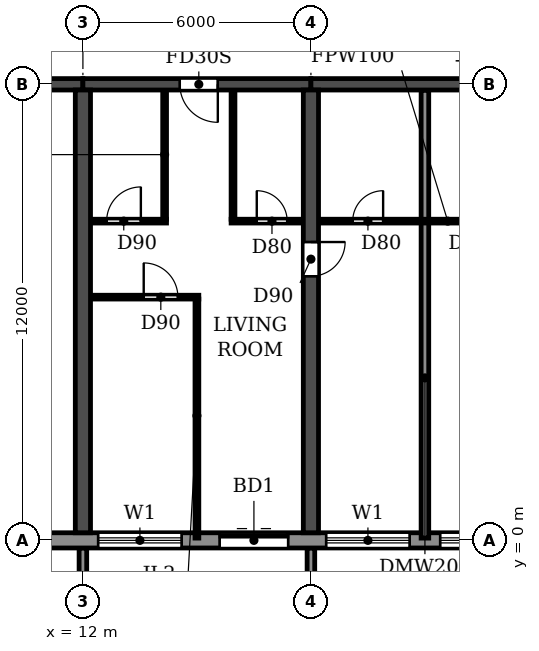
"""IFC4 building model, lengths in metres.
Left out: names, types, materials, properties, quantities, classifications, styles, units other than length and angle.
Written with IfcOpenShell. Run it as: python <this file> out.ifc"""

import sys

from ifc_helpers import new_model, si_unit, direction, frame, frame_2d, origin, place, context, subcontext, project, spatial, polyline, rectangle, outline, extrude, source, transform, mapped, element, fill, save


model = new_model("IFC4")
c1 = context("Model", 3, precision=1e-05, world=origin(), true_north=direction((0.0, 1.0)))
c2 = subcontext(c1, "Body", "Model", "MODEL_VIEW")
j1 = project(units=[si_unit("LENGTHUNIT", "METRE"), si_unit("PLANEANGLEUNIT", "RADIAN")], contexts=[c1])
p1 = place(None, origin())
s1 = spatial("IfcSite", under=j1, at=p1, CompositionType="ELEMENT")
p2 = place(p1, origin())
s2 = spatial("IfcBuilding", under=s1, at=p2, CompositionType="ELEMENT")
p3 = place(p2, frame((0.0, 0.0, 56.4)))
s3 = spatial("IfcBuildingStorey", under=s2, at=p3, CompositionType="ELEMENT", Elevation=56.4)
p4 = place(p3, frame((12.0, 0.2, 0.0), z_axis=(0.0, 0.0, 1.0), x_axis=(0.0, 1.0, 0.0)))
e1 = element("IfcWall", 1, at=p4, inside=s3, PredefinedType="SHEAR", context=c2, shape_type="SweptSolid", body=[
    extrude(rectangle(XDim=11.65, YDim=0.4, at=frame_2d((5.825, 0.0))), origin(), (0.0, 0.0, 1.0), 3.05),
])
p5 = place(p3, frame((18.0, 0.2, 0.0), z_axis=(0.0, 0.0, 1.0), x_axis=(0.0, 1.0, 0.0)))
e2 = element("IfcWall", 2, at=p5, inside=s3, PredefinedType="SHEAR", context=c2, shape_type="SweptSolid", body=[
    extrude(rectangle(XDim=11.65, YDim=0.4, at=frame_2d((5.825, 0.0))), origin(), (0.0, 0.0, 1.0), 3.05),
])
p6 = place(p5, frame((6.75, 0.0, 0.0)))
e3 = element("IfcOpeningElement", 3, at=p6, cuts=e2, PredefinedType="OPENING", context=c2, shape_type="SweptSolid", body=[
    extrude(rectangle(XDim=0.9, YDim=2.1, at=frame_2d((0.45, 1.05))), frame((0.0, 0.21, 0.0), z_axis=(0.0, -1.0, 0.0), x_axis=(1.0, 0.0, 0.0)), (0.0, 0.0, 1.0), 0.42),
])
p7 = place(p3, frame((6.2, 12.0, 0.0), z_axis=(0.0, 0.0, 1.0), x_axis=(1.0, 0.0, 0.0)))
e4 = element("IfcWall", 4, at=p7, inside=s3, PredefinedType="SHEAR", context=c2, shape_type="SweptSolid", body=[
    extrude(rectangle(XDim=5.8, YDim=0.3, at=frame_2d((2.9, 0.0))), origin(), (0.0, 0.0, 1.0), 2.45),
])
p8 = place(p7, frame((2.3, 0.0, 0.0)))
e5 = element("IfcOpeningElement", 5, at=p8, cuts=e4, PredefinedType="OPENING", context=c2, shape_type="SweptSolid", body=[
    extrude(rectangle(XDim=1.0, YDim=2.1, at=frame_2d((0.5, 1.05))), frame((0.0, 0.16, 0.0), z_axis=(0.0, -1.0, 0.0), x_axis=(1.0, 0.0, 0.0)), (0.0, 0.0, 1.0), 0.32),
])
p9 = place(p3, frame((12.0, 12.0, 0.0), z_axis=(0.0, 0.0, 1.0), x_axis=(1.0, 0.0, 0.0)))
e6 = element("IfcWall", 6, at=p9, inside=s3, PredefinedType="SHEAR", context=c2, shape_type="SweptSolid", body=[
    extrude(rectangle(XDim=6.0, YDim=0.3, at=frame_2d((3.0, 0.0))), origin(), (0.0, 0.0, 1.0), 2.45),
])
p10 = place(p9, frame((2.55, 0.0, 0.0)))
e7 = element("IfcOpeningElement", 7, at=p10, cuts=e6, PredefinedType="OPENING", context=c2, shape_type="SweptSolid", body=[
    extrude(rectangle(XDim=1.0, YDim=2.1, at=frame_2d((0.5, 1.05))), frame((0.0, 0.16, 0.0), z_axis=(0.0, -1.0, 0.0), x_axis=(1.0, 0.0, 0.0)), (0.0, 0.0, 1.0), 0.32),
])
p11 = place(p3, frame((18.0, 12.0, 0.0), z_axis=(0.0, 0.0, 1.0), x_axis=(1.0, 0.0, 0.0)))
e8 = element("IfcWall", 8, at=p11, inside=s3, PredefinedType="SHEAR", context=c2, shape_type="SweptSolid", body=[
    extrude(rectangle(XDim=6.0, YDim=0.3, at=frame_2d((3.0, 0.0))), origin(), (0.0, 0.0, 1.0), 2.45),
])
p12 = place(p3, frame((10.683, 0.0, 0.0), z_axis=(0.0, 0.0, 1.0), x_axis=(1.0, 0.0, 0.0)))
e9 = element("IfcWall", 9, at=p12, inside=s3, PredefinedType="STANDARD", context=c2, shape_type="SweptSolid", body=[
    extrude(rectangle(XDim=80.634, YDim=0.4, at=frame_2d((40.317, 0.0))), origin(), (0.0, 0.0, 1.0), 3.05),
])
p13 = place(p12, frame((1.717, 0.0, 0.9)))
e10 = element("IfcOpeningElement", 10, at=p13, cuts=e9, PredefinedType="OPENING", context=c2, shape_type="SweptSolid", body=[
    extrude(rectangle(XDim=2.2, YDim=1.5, at=frame_2d((1.1, 0.75))), frame((0.0, 0.21, 0.0), z_axis=(0.0, -1.0, 0.0), x_axis=(1.0, 0.0, 0.0)), (0.0, 0.0, 1.0), 0.42),
])
p14 = place(p12, frame((4.917, 0.0, 0.0)))
e11 = element("IfcOpeningElement", 11, at=p14, cuts=e9, PredefinedType="OPENING", context=c2, shape_type="SweptSolid", body=[
    extrude(rectangle(XDim=1.8, YDim=2.4, at=frame_2d((0.9, 1.2))), frame((0.0, 0.21, 0.0), z_axis=(0.0, -1.0, 0.0), x_axis=(1.0, 0.0, 0.0)), (0.0, 0.0, 1.0), 0.42),
])
p15 = place(p12, frame((7.717, 0.0, 0.9)))
e12 = element("IfcOpeningElement", 12, at=p15, cuts=e9, PredefinedType="OPENING", context=c2, shape_type="SweptSolid", body=[
    extrude(rectangle(XDim=2.2, YDim=1.5, at=frame_2d((1.1, 0.75))), frame((0.0, 0.21, 0.0), z_axis=(0.0, -1.0, 0.0), x_axis=(1.0, 0.0, 0.0)), (0.0, 0.0, 1.0), 0.42),
])
p16 = place(p12, frame((10.717, 0.0, 0.9)))
e13 = element("IfcOpeningElement", 13, at=p16, cuts=e9, PredefinedType="OPENING", context=c2, shape_type="SweptSolid", body=[
    extrude(rectangle(XDim=2.2, YDim=1.5, at=frame_2d((1.1, 0.75))), frame((0.0, 0.21, 0.0), z_axis=(0.0, -1.0, 0.0), x_axis=(1.0, 0.0, 0.0)), (0.0, 0.0, 1.0), 0.42),
])
p17 = place(p12, frame((13.717, 0.0, 0.9)))
e14 = element("IfcOpeningElement", 14, at=p17, cuts=e9, PredefinedType="OPENING", context=c2, shape_type="SweptSolid", body=[
    extrude(rectangle(XDim=2.2, YDim=1.5, at=frame_2d((1.1, 0.75))), frame((0.0, 0.21, 0.0), z_axis=(0.0, -1.0, 0.0), x_axis=(1.0, 0.0, 0.0)), (0.0, 0.0, 1.0), 0.42),
])
p18 = place(p12, frame((16.917, 0.0, 0.0)))
e15 = element("IfcOpeningElement", 15, at=p18, cuts=e9, PredefinedType="OPENING", context=c2, shape_type="SweptSolid", body=[
    extrude(rectangle(XDim=1.8, YDim=2.4, at=frame_2d((0.9, 1.2))), frame((0.0, 0.21, 0.0), z_axis=(0.0, -1.0, 0.0), x_axis=(1.0, 0.0, 0.0)), (0.0, 0.0, 1.0), 0.42),
])
p19 = place(p12, frame((19.717, 0.0, 0.9)))
e16 = element("IfcOpeningElement", 16, at=p19, cuts=e9, PredefinedType="OPENING", context=c2, shape_type="SweptSolid", body=[
    extrude(rectangle(XDim=2.2, YDim=1.5, at=frame_2d((1.1, 0.75))), frame((0.0, 0.21, 0.0), z_axis=(0.0, -1.0, 0.0), x_axis=(1.0, 0.0, 0.0)), (0.0, 0.0, 1.0), 0.42),
])
p20 = place(p12, frame((22.717, 0.0, 0.9)))
e17 = element("IfcOpeningElement", 17, at=p20, cuts=e9, PredefinedType="OPENING", context=c2, shape_type="SweptSolid", body=[
    extrude(rectangle(XDim=2.2, YDim=1.5, at=frame_2d((1.1, 0.75))), frame((0.0, 0.21, 0.0), z_axis=(0.0, -1.0, 0.0), x_axis=(1.0, 0.0, 0.0)), (0.0, 0.0, 1.0), 0.42),
])
p21 = place(p12, frame((25.917, 0.0, 0.0)))
e18 = element("IfcOpeningElement", 18, at=p21, cuts=e9, PredefinedType="OPENING", context=c2, shape_type="SweptSolid", body=[
    extrude(rectangle(XDim=1.8, YDim=2.4, at=frame_2d((0.9, 1.2))), frame((0.0, 0.21, 0.0), z_axis=(0.0, -1.0, 0.0), x_axis=(1.0, 0.0, 0.0)), (0.0, 0.0, 1.0), 0.42),
])
p22 = place(p12, frame((28.717, 0.0, 0.9)))
e19 = element("IfcOpeningElement", 19, at=p22, cuts=e9, PredefinedType="OPENING", context=c2, shape_type="SweptSolid", body=[
    extrude(rectangle(XDim=2.2, YDim=1.5, at=frame_2d((1.1, 0.75))), frame((0.0, 0.21, 0.0), z_axis=(0.0, -1.0, 0.0), x_axis=(1.0, 0.0, 0.0)), (0.0, 0.0, 1.0), 0.42),
])
p23 = place(p12, frame((31.717, 0.0, 0.9)))
e20 = element("IfcOpeningElement", 20, at=p23, cuts=e9, PredefinedType="OPENING", context=c2, shape_type="SweptSolid", body=[
    extrude(rectangle(XDim=2.2, YDim=1.5, at=frame_2d((1.1, 0.75))), frame((0.0, 0.21, 0.0), z_axis=(0.0, -1.0, 0.0), x_axis=(1.0, 0.0, 0.0)), (0.0, 0.0, 1.0), 0.42),
])
p24 = place(p12, frame((34.717, 0.0, 0.9)))
e21 = element("IfcOpeningElement", 21, at=p24, cuts=e9, PredefinedType="OPENING", context=c2, shape_type="SweptSolid", body=[
    extrude(rectangle(XDim=2.2, YDim=1.5, at=frame_2d((1.1, 0.75))), frame((0.0, 0.21, 0.0), z_axis=(0.0, -1.0, 0.0), x_axis=(1.0, 0.0, 0.0)), (0.0, 0.0, 1.0), 0.42),
])
p25 = place(p12, frame((37.717, 0.0, 0.9)))
e22 = element("IfcOpeningElement", 22, at=p25, cuts=e9, PredefinedType="OPENING", context=c2, shape_type="SweptSolid", body=[
    extrude(rectangle(XDim=2.2, YDim=1.5, at=frame_2d((1.1, 0.75))), frame((0.0, 0.21, 0.0), z_axis=(0.0, -1.0, 0.0), x_axis=(1.0, 0.0, 0.0)), (0.0, 0.0, 1.0), 0.42),
])
p26 = place(p12, frame((40.917, 0.0, 0.0)))
e23 = element("IfcOpeningElement", 23, at=p26, cuts=e9, PredefinedType="OPENING", context=c2, shape_type="SweptSolid", body=[
    extrude(rectangle(XDim=1.8, YDim=2.4, at=frame_2d((0.9, 1.2))), frame((0.0, 0.21, 0.0), z_axis=(0.0, -1.0, 0.0), x_axis=(1.0, 0.0, 0.0)), (0.0, 0.0, 1.0), 0.42),
])
p27 = place(p12, frame((43.717, 0.0, 0.9)))
e24 = element("IfcOpeningElement", 24, at=p27, cuts=e9, PredefinedType="OPENING", context=c2, shape_type="SweptSolid", body=[
    extrude(rectangle(XDim=2.2, YDim=1.5, at=frame_2d((1.1, 0.75))), frame((0.0, 0.21, 0.0), z_axis=(0.0, -1.0, 0.0), x_axis=(1.0, 0.0, 0.0)), (0.0, 0.0, 1.0), 0.42),
])
p28 = place(p12, frame((46.717, 0.0, 0.9)))
e25 = element("IfcOpeningElement", 25, at=p28, cuts=e9, PredefinedType="OPENING", context=c2, shape_type="SweptSolid", body=[
    extrude(rectangle(XDim=2.2, YDim=1.5, at=frame_2d((1.1, 0.75))), frame((0.0, 0.21, 0.0), z_axis=(0.0, -1.0, 0.0), x_axis=(1.0, 0.0, 0.0)), (0.0, 0.0, 1.0), 0.42),
])
p29 = place(p12, frame((49.717, 0.0, 0.9)))
e26 = element("IfcOpeningElement", 26, at=p29, cuts=e9, PredefinedType="OPENING", context=c2, shape_type="SweptSolid", body=[
    extrude(rectangle(XDim=2.2, YDim=1.5, at=frame_2d((1.1, 0.75))), frame((0.0, 0.21, 0.0), z_axis=(0.0, -1.0, 0.0), x_axis=(1.0, 0.0, 0.0)), (0.0, 0.0, 1.0), 0.42),
])
p30 = place(p12, frame((52.717, 0.0, 0.9)))
e27 = element("IfcOpeningElement", 27, at=p30, cuts=e9, PredefinedType="OPENING", context=c2, shape_type="SweptSolid", body=[
    extrude(rectangle(XDim=2.2, YDim=1.5, at=frame_2d((1.1, 0.75))), frame((0.0, 0.21, 0.0), z_axis=(0.0, -1.0, 0.0), x_axis=(1.0, 0.0, 0.0)), (0.0, 0.0, 1.0), 0.42),
])
p31 = place(p12, frame((55.717, 0.0, 0.9)))
e28 = element("IfcOpeningElement", 28, at=p31, cuts=e9, PredefinedType="OPENING", context=c2, shape_type="SweptSolid", body=[
    extrude(rectangle(XDim=2.2, YDim=1.5, at=frame_2d((1.1, 0.75))), frame((0.0, 0.21, 0.0), z_axis=(0.0, -1.0, 0.0), x_axis=(1.0, 0.0, 0.0)), (0.0, 0.0, 1.0), 0.42),
])
p32 = place(p12, frame((58.717, 0.0, 0.9)))
e29 = element("IfcOpeningElement", 29, at=p32, cuts=e9, PredefinedType="OPENING", context=c2, shape_type="SweptSolid", body=[
    extrude(rectangle(XDim=2.2, YDim=1.5, at=frame_2d((1.1, 0.75))), frame((0.0, 0.21, 0.0), z_axis=(0.0, -1.0, 0.0), x_axis=(1.0, 0.0, 0.0)), (0.0, 0.0, 1.0), 0.42),
])
p33 = place(p12, frame((61.717, 0.0, 0.9)))
e30 = element("IfcOpeningElement", 30, at=p33, cuts=e9, PredefinedType="OPENING", context=c2, shape_type="SweptSolid", body=[
    extrude(rectangle(XDim=2.2, YDim=1.5, at=frame_2d((1.1, 0.75))), frame((0.0, 0.21, 0.0), z_axis=(0.0, -1.0, 0.0), x_axis=(1.0, 0.0, 0.0)), (0.0, 0.0, 1.0), 0.42),
])
p34 = place(p12, frame((64.917, 0.0, 0.0)))
e31 = element("IfcOpeningElement", 31, at=p34, cuts=e9, PredefinedType="OPENING", context=c2, shape_type="SweptSolid", body=[
    extrude(rectangle(XDim=1.8, YDim=2.4, at=frame_2d((0.9, 1.2))), frame((0.0, 0.21, 0.0), z_axis=(0.0, -1.0, 0.0), x_axis=(1.0, 0.0, 0.0)), (0.0, 0.0, 1.0), 0.42),
])
p35 = place(p12, frame((67.717, 0.0, 0.9)))
e32 = element("IfcOpeningElement", 32, at=p35, cuts=e9, PredefinedType="OPENING", context=c2, shape_type="SweptSolid", body=[
    extrude(rectangle(XDim=2.2, YDim=1.5, at=frame_2d((1.1, 0.75))), frame((0.0, 0.21, 0.0), z_axis=(0.0, -1.0, 0.0), x_axis=(1.0, 0.0, 0.0)), (0.0, 0.0, 1.0), 0.42),
])
p36 = place(p12, frame((70.717, 0.0, 0.9)))
e33 = element("IfcOpeningElement", 33, at=p36, cuts=e9, PredefinedType="OPENING", context=c2, shape_type="SweptSolid", body=[
    extrude(rectangle(XDim=2.2, YDim=1.5, at=frame_2d((1.1, 0.75))), frame((0.0, 0.21, 0.0), z_axis=(0.0, -1.0, 0.0), x_axis=(1.0, 0.0, 0.0)), (0.0, 0.0, 1.0), 0.42),
])
p37 = place(p12, frame((73.717, 0.0, 0.9)))
e34 = element("IfcOpeningElement", 34, at=p37, cuts=e9, PredefinedType="OPENING", context=c2, shape_type="SweptSolid", body=[
    extrude(rectangle(XDim=2.2, YDim=1.5, at=frame_2d((1.1, 0.75))), frame((0.0, 0.21, 0.0), z_axis=(0.0, -1.0, 0.0), x_axis=(1.0, 0.0, 0.0)), (0.0, 0.0, 1.0), 0.42),
])
p38 = place(p12, frame((76.917, 0.0, 0.0)))
e35 = element("IfcOpeningElement", 35, at=p38, cuts=e9, PredefinedType="OPENING", context=c2, shape_type="SweptSolid", body=[
    extrude(rectangle(XDim=1.8, YDim=2.4, at=frame_2d((0.9, 1.2))), frame((0.0, 0.21, 0.0), z_axis=(0.0, -1.0, 0.0), x_axis=(1.0, 0.0, 0.0)), (0.0, 0.0, 1.0), 0.42),
])
m1 = source(origin(), c2, "Body", "SweptSolid", [
    extrude(outline(polyline([(0.0, 0.0), (0.2, 0.0), (0.2, 1.65), (0.0, 1.65), (0.0, 0.0)])), origin(), (0.0, 0.0, 1.0), 3.1),
])
for number, where in (
    (36, (11.9, -1.85, 0.0)),
    (37, (17.9, -1.85, 0.0)),
):
    element("IfcWall", number, at=place(p3, frame(where)), inside=s3, PredefinedType="STANDARD", context=c2, shape_type="MappedRepresentation", body=[
        mapped(m1, transform((0.0, 0.0, 0.0))),
    ])
p39 = place(p3, frame((21.0, 0.06, 0.0), z_axis=(0.0, 0.0, 1.0), x_axis=(0.0, 1.0, 0.0)))
e38 = element("IfcWall", 38, at=p39, inside=s3, PredefinedType="PARTITIONING", context=c2, shape_type="SweptSolid", body=[
    extrude(rectangle(XDim=11.78, YDim=0.2, at=frame_2d((5.89, 0.0))), origin(), (0.0, 0.0, 1.0), 3.05),
])
p40 = place(p3, frame((12.21, 6.4, 0.0), z_axis=(0.0, 0.0, 1.0), x_axis=(1.0, 0.0, 0.0)))
e39 = element("IfcWall", 39, at=p40, inside=s3, PredefinedType="PARTITIONING", context=c2, shape_type="SweptSolid", body=[
    extrude(rectangle(XDim=2.84, YDim=0.1, at=frame_2d((1.42, 0.0))), origin(), (0.0, 0.0, 1.0), 3.05),
])
p41 = place(p40, frame((1.39, 0.0, 0.0)))
e40 = element("IfcOpeningElement", 40, at=p41, cuts=e39, PredefinedType="OPENING", context=c2, shape_type="SweptSolid", body=[
    extrude(rectangle(XDim=0.9, YDim=2.1, at=frame_2d((0.45, 1.05))), frame((0.0, 0.06, 0.0), z_axis=(0.0, -1.0, 0.0), x_axis=(1.0, 0.0, 0.0)), (0.0, 0.0, 1.0), 0.12),
])
p42 = place(p3, frame((12.21, 8.4, 0.0), z_axis=(0.0, 0.0, 1.0), x_axis=(1.0, 0.0, 0.0)))
e41 = element("IfcWall", 41, at=p42, inside=s3, PredefinedType="PARTITIONING", context=c2, shape_type="SweptSolid", body=[
    extrude(rectangle(XDim=1.99, YDim=0.1, at=frame_2d((0.995, 0.0))), origin(), (0.0, 0.0, 1.0), 3.05),
])
p43 = place(p42, frame((0.415, 0.0, 0.0)))
e42 = element("IfcOpeningElement", 42, at=p43, cuts=e41, PredefinedType="OPENING", context=c2, shape_type="SweptSolid", body=[
    extrude(rectangle(XDim=0.9, YDim=2.1, at=frame_2d((0.45, 1.05))), frame((0.0, 0.06, 0.0), z_axis=(0.0, -1.0, 0.0), x_axis=(1.0, 0.0, 0.0)), (0.0, 0.0, 1.0), 0.12),
])
p44 = place(p3, frame((15.9, 8.4, 0.0), z_axis=(0.0, 0.0, 1.0), x_axis=(1.0, 0.0, 0.0)))
e43 = element("IfcWall", 43, at=p44, inside=s3, PredefinedType="PARTITIONING", context=c2, shape_type="SweptSolid", body=[
    extrude(rectangle(XDim=1.89, YDim=0.1, at=frame_2d((0.945, 0.0))), origin(), (0.0, 0.0, 1.0), 3.05),
])
p45 = place(p44, frame((0.675, 0.0, 0.0)))
e44 = element("IfcOpeningElement", 44, at=p45, cuts=e43, PredefinedType="OPENING", context=c2, shape_type="SweptSolid", body=[
    extrude(rectangle(XDim=0.8, YDim=2.1, at=frame_2d((0.4, 1.05))), frame((0.0, 0.06, 0.0), z_axis=(0.0, -1.0, 0.0), x_axis=(1.0, 0.0, 0.0)), (0.0, 0.0, 1.0), 0.12),
])
p46 = place(p3, frame((18.21, 8.4, 0.0), z_axis=(0.0, 0.0, 1.0), x_axis=(1.0, 0.0, 0.0)))
e45 = element("IfcWall", 45, at=p46, inside=s3, PredefinedType="PARTITIONING", context=c2, shape_type="SweptSolid", body=[
    extrude(rectangle(XDim=5.58, YDim=0.1, at=frame_2d((2.79, 0.0))), origin(), (0.0, 0.0, 1.0), 3.05),
])
p47 = place(p46, frame((0.89, 0.0, 0.0)))
e46 = element("IfcOpeningElement", 46, at=p47, cuts=e45, PredefinedType="OPENING", context=c2, shape_type="SweptSolid", body=[
    extrude(rectangle(XDim=0.8, YDim=2.1, at=frame_2d((0.4, 1.05))), frame((0.0, 0.06, 0.0), z_axis=(0.0, -1.0, 0.0), x_axis=(1.0, 0.0, 0.0)), (0.0, 0.0, 1.0), 0.12),
])
p48 = place(p46, frame((3.89, 0.0, 0.0)))
e47 = element("IfcOpeningElement", 47, at=p48, cuts=e45, PredefinedType="OPENING", context=c2, shape_type="SweptSolid", body=[
    extrude(rectangle(XDim=0.8, YDim=2.1, at=frame_2d((0.4, 1.05))), frame((0.0, 0.06, 0.0), z_axis=(0.0, -1.0, 0.0), x_axis=(1.0, 0.0, 0.0)), (0.0, 0.0, 1.0), 0.12),
])
p49 = place(p3, frame((14.15, 8.45, 0.0), z_axis=(0.0, 0.0, 1.0), x_axis=(0.0, 1.0, 0.0)))
e48 = element("IfcWall", 48, at=p49, inside=s3, PredefinedType="PARTITIONING", context=c2, shape_type="SweptSolid", body=[
    extrude(rectangle(XDim=3.39, YDim=0.1, at=frame_2d((1.695, 0.0))), origin(), (0.0, 0.0, 1.0), 3.05),
])
p50 = place(p3, frame((15.0, 0.06, 0.0), z_axis=(0.0, 0.0, 1.0), x_axis=(0.0, 1.0, 0.0)))
e49 = element("IfcWall", 49, at=p50, inside=s3, PredefinedType="PARTITIONING", context=c2, shape_type="SweptSolid", body=[
    extrude(rectangle(XDim=6.29, YDim=0.1, at=frame_2d((3.145, 0.0))), origin(), (0.0, 0.0, 1.0), 3.05),
])
p51 = place(p3, frame((15.95, 8.45, 0.0), z_axis=(0.0, 0.0, 1.0), x_axis=(0.0, 1.0, 0.0)))
e50 = element("IfcWall", 50, at=p51, inside=s3, PredefinedType="PARTITIONING", context=c2, shape_type="SweptSolid", body=[
    extrude(rectangle(XDim=3.39, YDim=0.1, at=frame_2d((1.695, 0.0))), origin(), (0.0, 0.0, 1.0), 3.05),
])
p52 = place(p13, origin())
e51 = element("IfcWindow", 51, at=p52, inside=s3, PartitioningType="DOUBLE_PANEL_HORIZONTAL", PredefinedType="WINDOW", context=c2, shape_type="SweptSolid", body=[
    extrude(rectangle(XDim=2.2, YDim=1.5, at=frame_2d((1.1, 0.75))), frame((0.0, 0.03, 0.0), z_axis=(0.0, -1.0, 0.0), x_axis=(1.0, 0.0, 0.0)), (0.0, 0.0, 1.0), 0.06),
])
fill(e10, e51)
p53 = place(p14, origin())
e52 = element("IfcDoor", 52, at=p53, inside=s3, OperationType="DOUBLE_DOOR_SLIDING", PredefinedType="DOOR", context=c2, shape_type="SweptSolid", body=[
    extrude(rectangle(XDim=1.8, YDim=2.4, at=frame_2d((0.9, 1.2))), frame((0.0, 0.025, 0.0), z_axis=(0.0, -1.0, 0.0), x_axis=(1.0, 0.0, 0.0)), (0.0, 0.0, 1.0), 0.05),
])
fill(e11, e52)
p54 = place(p15, origin())
e53 = element("IfcWindow", 53, at=p54, inside=s3, PartitioningType="DOUBLE_PANEL_HORIZONTAL", PredefinedType="WINDOW", context=c2, shape_type="SweptSolid", body=[
    extrude(rectangle(XDim=2.2, YDim=1.5, at=frame_2d((1.1, 0.75))), frame((0.0, 0.03, 0.0), z_axis=(0.0, -1.0, 0.0), x_axis=(1.0, 0.0, 0.0)), (0.0, 0.0, 1.0), 0.06),
])
fill(e12, e53)
p55 = place(p16, origin())
e54 = element("IfcWindow", 54, at=p55, inside=s3, PartitioningType="DOUBLE_PANEL_HORIZONTAL", PredefinedType="WINDOW", context=c2, shape_type="SweptSolid", body=[
    extrude(rectangle(XDim=2.2, YDim=1.5, at=frame_2d((1.1, 0.75))), frame((0.0, 0.03, 0.0), z_axis=(0.0, -1.0, 0.0), x_axis=(1.0, 0.0, 0.0)), (0.0, 0.0, 1.0), 0.06),
])
fill(e13, e54)
p56 = place(p47, origin())
e55 = element("IfcDoor", 55, at=p56, inside=s3, OperationType="SINGLE_SWING_RIGHT", PredefinedType="DOOR", context=c2, shape_type="SweptSolid", body=[
    extrude(rectangle(XDim=0.8, YDim=2.1, at=frame_2d((0.4, 1.05))), frame((0.0, 0.025, 0.0), z_axis=(0.0, -1.0, 0.0), x_axis=(1.0, 0.0, 0.0)), (0.0, 0.0, 1.0), 0.05),
])
fill(e46, e55)
p57 = place(p43, origin())
e56 = element("IfcDoor", 56, at=p57, inside=s3, OperationType="SINGLE_SWING_RIGHT", PredefinedType="DOOR", context=c2, shape_type="SweptSolid", body=[
    extrude(rectangle(XDim=0.9, YDim=2.1, at=frame_2d((0.45, 1.05))), frame((0.0, 0.025, 0.0), z_axis=(0.0, -1.0, 0.0), x_axis=(1.0, 0.0, 0.0)), (0.0, 0.0, 1.0), 0.05),
])
fill(e42, e56)
p58 = place(p41, origin())
e57 = element("IfcDoor", 57, at=p58, inside=s3, OperationType="SINGLE_SWING_LEFT", PredefinedType="DOOR", context=c2, shape_type="SweptSolid", body=[
    extrude(rectangle(XDim=0.9, YDim=2.1, at=frame_2d((0.45, 1.05))), frame((0.0, 0.025, 0.0), z_axis=(0.0, -1.0, 0.0), x_axis=(1.0, 0.0, 0.0)), (0.0, 0.0, 1.0), 0.05),
])
fill(e40, e57)
p59 = place(p10, frame((1.0, 0.0, 0.0), z_axis=(0.0, 0.0, 1.0), x_axis=(-1.0, 0.0, 0.0)))
e58 = element("IfcDoor", 58, at=p59, inside=s3, OperationType="SINGLE_SWING_LEFT", PredefinedType="DOOR", context=c2, shape_type="SweptSolid", body=[
    extrude(rectangle(XDim=1.0, YDim=2.1, at=frame_2d((0.5, 1.05))), frame((0.0, 0.025, 0.0), z_axis=(0.0, -1.0, 0.0), x_axis=(1.0, 0.0, 0.0)), (0.0, 0.0, 1.0), 0.05),
])
fill(e7, e58)
p60 = place(p45, origin())
e59 = element("IfcDoor", 59, at=p60, inside=s3, OperationType="SINGLE_SWING_LEFT", PredefinedType="DOOR", context=c2, shape_type="SweptSolid", body=[
    extrude(rectangle(XDim=0.8, YDim=2.1, at=frame_2d((0.4, 1.05))), frame((0.0, 0.025, 0.0), z_axis=(0.0, -1.0, 0.0), x_axis=(1.0, 0.0, 0.0)), (0.0, 0.0, 1.0), 0.05),
])
fill(e44, e59)
p61 = place(p6, frame((0.9, 0.0, 0.0), z_axis=(0.0, 0.0, 1.0), x_axis=(-1.0, 0.0, 0.0)))
e60 = element("IfcDoor", 60, at=p61, inside=s3, OperationType="SINGLE_SWING_LEFT", PredefinedType="DOOR", context=c2, shape_type="SweptSolid", body=[
    extrude(rectangle(XDim=0.9, YDim=2.1, at=frame_2d((0.45, 1.05))), frame((0.0, 0.025, 0.0), z_axis=(0.0, -1.0, 0.0), x_axis=(1.0, 0.0, 0.0)), (0.0, 0.0, 1.0), 0.05),
])
fill(e3, e60)
save(model, sys.argv[1])
